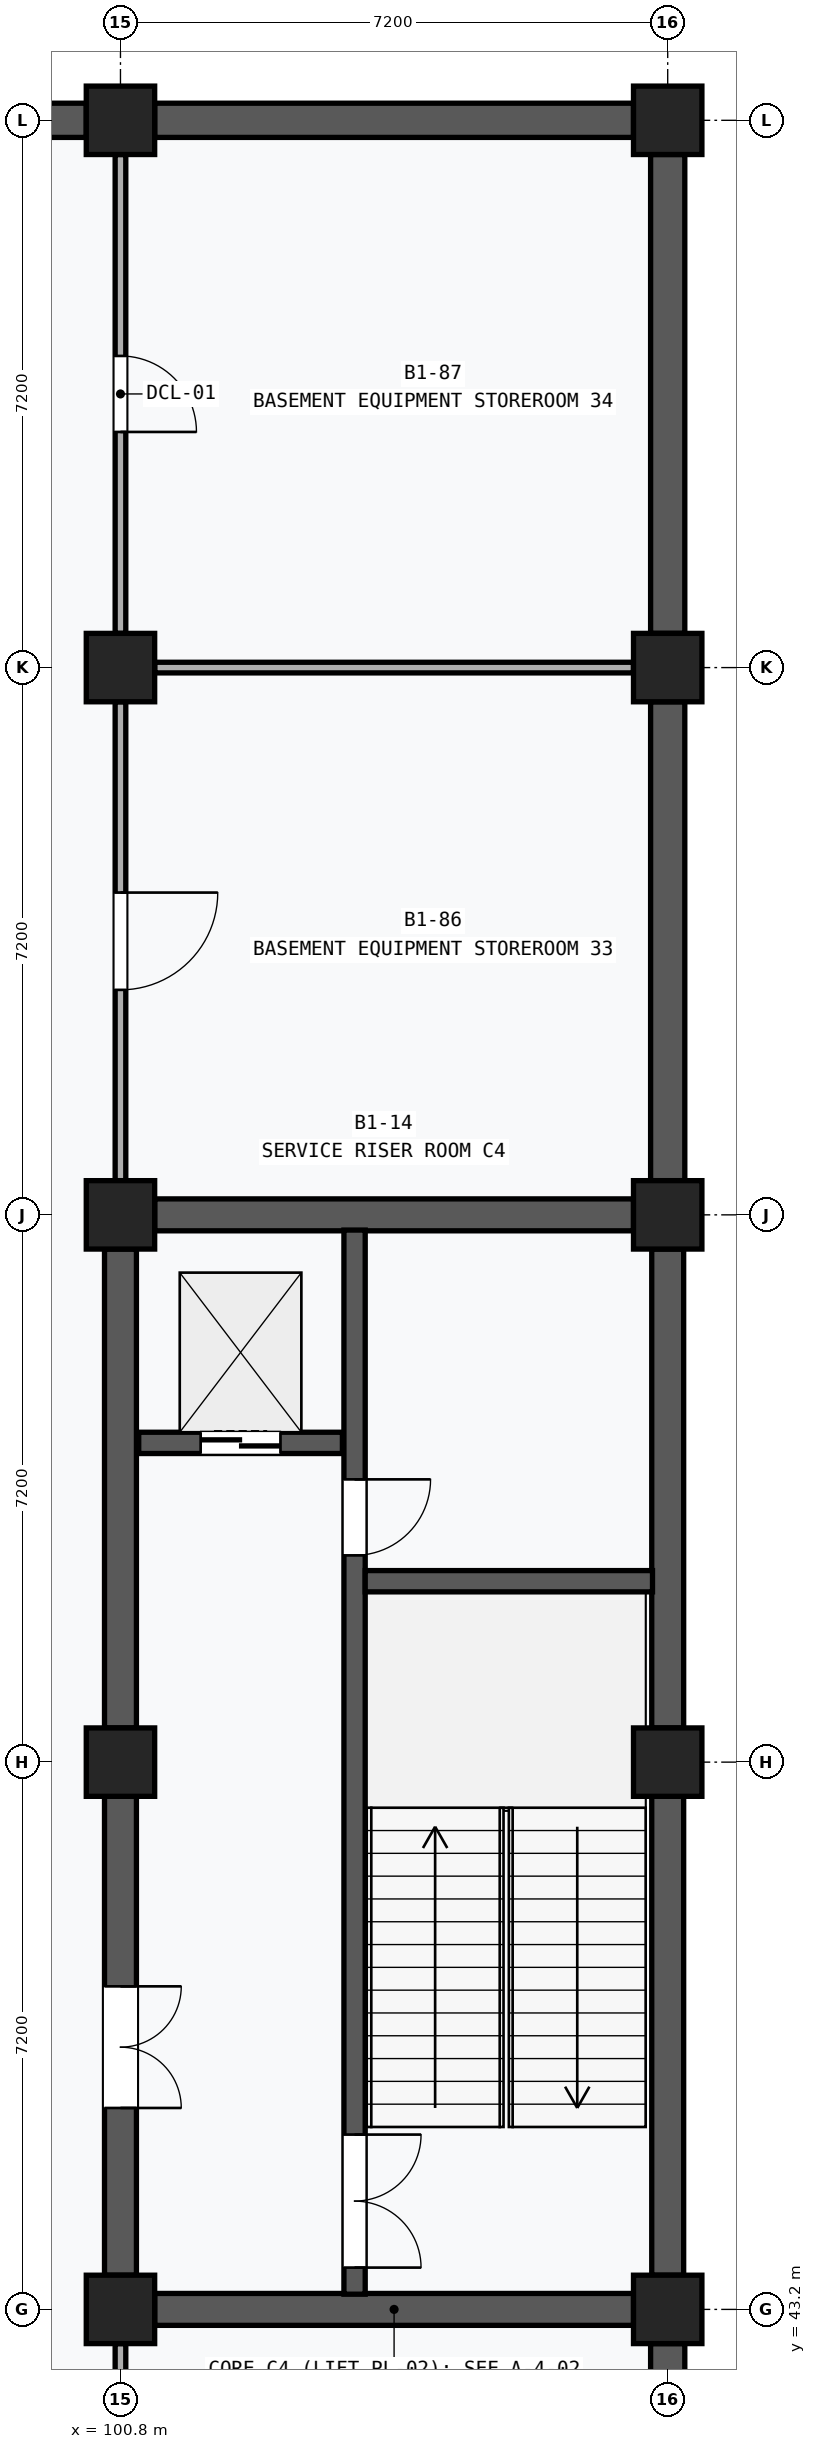
"""IFC4 building model, lengths in metres.
Left out: names, types, materials, properties, quantities, classifications, styles, units other than length and angle.
Written with IfcOpenShell. Run it as: python <this file> out.ifc"""

import sys

from ifc_helpers import new_model, si_unit, direction, frame, frame_2d, origin, origin_2d, place, context, subcontext, project, spatial, rectangle, extrude, element, fill, save


model = new_model("IFC4")
c1 = context("Model", 3, precision=1e-05, world=origin(), true_north=direction((0.0, 1.0)))
c2 = subcontext(c1, "Body", "Model", "MODEL_VIEW")
j1 = project(units=[si_unit("LENGTHUNIT", "METRE"), si_unit("PLANEANGLEUNIT", "RADIAN")], contexts=[c1])
p1 = place(None, origin())
s1 = spatial("IfcSite", under=j1, at=p1, CompositionType="ELEMENT")
p2 = place(p1, origin())
s2 = spatial("IfcBuilding", under=s1, at=p2, CompositionType="ELEMENT")
p3 = place(p2, frame((0.0, 0.0, -4.5)))
s3 = spatial("IfcBuildingStorey", under=s2, at=p3, CompositionType="ELEMENT", Elevation=-4.5)
for number, where, z_axis, x_axis in (
    (1, (100.8, 43.2, 0.0), (0.0, 0.0, 1.0), (1.0, 0.0, 0.0)),
    (2, (100.8, 50.4, 0.0), (0.0, 0.0, 1.0), (1.0, 0.0, 0.0)),
    (3, (100.8, 57.6, 0.0), (0.0, 0.0, 1.0), (1.0, 0.0, 0.0)),
    (4, (100.8, 64.8, 0.0), (0.0, 0.0, 1.0), (1.0, 0.0, 0.0)),
    (5, (100.8, 72.0, 0.0), (0.0, 0.0, 1.0), (1.0, 0.0, 0.0)),
    (6, (108.0, 43.2, 0.0), (0.0, 0.0, 1.0), (1.0, 0.0, 0.0)),
    (7, (108.0, 50.4, 0.0), (0.0, 0.0, 1.0), (1.0, 0.0, 0.0)),
    (8, (108.0, 57.6, 0.0), (0.0, 0.0, 1.0), (1.0, 0.0, 0.0)),
    (9, (108.0, 64.8, 0.0), (0.0, 0.0, 1.0), (1.0, 0.0, 0.0)),
    (10, (108.0, 72.0, 0.0), (0.0, 0.0, 1.0), (1.0, 0.0, 0.0)),
):
    element("IfcColumn", number, at=place(p3, frame(where, z_axis=z_axis, x_axis=x_axis)), inside=s3, PredefinedType="COLUMN", context=c2, shape_type="SweptSolid", body=[
        extrude(rectangle(XDim=0.9, YDim=0.9, at=origin_2d()), origin(), (0.0, 0.0, 1.0), 4.5),
    ])
p4 = place(p3, frame((94.0, 72.0, 0.0), z_axis=(0.0, 0.0, 1.0), x_axis=(1.0, 0.0, 0.0)))
e11 = element("IfcWall", 11, at=p4, inside=s3, PredefinedType="SOLIDWALL", context=c2, shape_type="SweptSolid", body=[
    extrude(rectangle(XDim=6.35, YDim=0.45, at=frame_2d((3.175, 0.0))), origin(), (0.0, 0.0, 1.0), 3.57),
])
for number, where, z_axis, x_axis in (
    (12, (108.0, 36.45, 0.0), (0.0, 0.0, 1.0), (0.0, 1.0, 0.0)),
    (13, (108.0, 58.05, 0.0), (0.0, 0.0, 1.0), (0.0, 1.0, 0.0)),
    (14, (101.25, 72.0, 0.0), (0.0, 0.0, 1.0), (1.0, 0.0, 0.0)),
    (15, (108.0, 65.25, 0.0), (0.0, 0.0, 1.0), (0.0, 1.0, 0.0)),
):
    element("IfcWall", number, at=place(p3, frame(where, z_axis=z_axis, x_axis=x_axis)), inside=s3, PredefinedType="SOLIDWALL", context=c2, shape_type="SweptSolid", body=[
        extrude(rectangle(XDim=6.3, YDim=0.45, at=frame_2d((3.15, 0.0))), origin(), (0.0, 0.0, 1.0), 3.57),
    ])
p5 = place(p3, frame((100.8, 43.65, 0.0), z_axis=(0.0, 0.0, 1.0), x_axis=(0.0, 1.0, 0.0)))
e16 = element("IfcWall", 16, at=p5, inside=s3, PredefinedType="SHEAR", context=c2, shape_type="SweptSolid", body=[
    extrude(rectangle(XDim=6.3, YDim=0.42, at=frame_2d((3.15, 0.0))), origin(), (0.0, 0.0, 1.0), 3.3),
])
p6 = place(p5, frame((2.2, 0.0, 0.0)))
e17 = element("IfcOpeningElement", 17, at=p6, cuts=e16, PredefinedType="OPENING", context=c2, shape_type="SweptSolid", body=[
    extrude(rectangle(XDim=1.6, YDim=2.2, at=frame_2d((0.8, 1.1))), frame((0.0, 0.222, 0.0), z_axis=(0.0, -1.0, 0.0), x_axis=(1.0, 0.0, 0.0)), (0.0, 0.0, 1.0), 0.444),
])
p7 = place(p3, frame((100.8, 50.85, 0.0), z_axis=(0.0, 0.0, 1.0), x_axis=(0.0, 1.0, 0.0)))
e18 = element("IfcWall", 18, at=p7, inside=s3, PredefinedType="SHEAR", context=c2, shape_type="SweptSolid", body=[
    extrude(rectangle(XDim=6.3, YDim=0.42, at=frame_2d((3.15, 0.0))), origin(), (0.0, 0.0, 1.0), 3.3),
])
p8 = place(p3, frame((108.0, 43.65, 0.0), z_axis=(0.0, 0.0, 1.0), x_axis=(0.0, 1.0, 0.0)))
e19 = element("IfcWall", 19, at=p8, inside=s3, PredefinedType="SHEAR", context=c2, shape_type="SweptSolid", body=[
    extrude(rectangle(XDim=6.3, YDim=0.42, at=frame_2d((3.15, 0.0))), origin(), (0.0, 0.0, 1.0), 3.57),
])
p9 = place(p3, frame((108.0, 50.85, 0.0), z_axis=(0.0, 0.0, 1.0), x_axis=(0.0, 1.0, 0.0)))
e20 = element("IfcWall", 20, at=p9, inside=s3, PredefinedType="SHEAR", context=c2, shape_type="SweptSolid", body=[
    extrude(rectangle(XDim=6.3, YDim=0.42, at=frame_2d((3.15, 0.0))), origin(), (0.0, 0.0, 1.0), 3.57),
])
for number, where, z_axis, x_axis in (
    (21, (101.25, 43.2, 0.0), (0.0, 0.0, 1.0), (1.0, 0.0, 0.0)),
    (22, (101.25, 57.6, 0.0), (0.0, 0.0, 1.0), (1.0, 0.0, 0.0)),
):
    element("IfcWall", number, at=place(p3, frame(where, z_axis=z_axis, x_axis=x_axis)), inside=s3, PredefinedType="SHEAR", context=c2, shape_type="SweptSolid", body=[
        extrude(rectangle(XDim=6.3, YDim=0.42, at=frame_2d((3.15, 0.0))), origin(), (0.0, 0.0, 1.0), 3.3),
    ])
p10 = place(p3, frame((103.88, 43.4, 0.0), z_axis=(0.0, 0.0, 1.0), x_axis=(0.0, 1.0, 0.0)))
e23 = element("IfcWall", 23, at=p10, inside=s3, PredefinedType="SHEAR", context=c2, shape_type="SweptSolid", body=[
    extrude(rectangle(XDim=14.0, YDim=0.28, at=frame_2d((7.0, 0.0))), origin(), (0.0, 0.0, 1.0), 4.2),
])
p11 = place(p10, frame((0.35, 0.0, 0.0)))
e24 = element("IfcOpeningElement", 24, at=p11, cuts=e23, PredefinedType="OPENING", context=c2, shape_type="SweptSolid", body=[
    extrude(rectangle(XDim=1.75, YDim=2.15, at=frame_2d((0.875, 1.075))), frame((0.0, 0.152, 0.0), z_axis=(0.0, -1.0, 0.0), x_axis=(1.0, 0.0, 0.0)), (0.0, 0.0, 1.0), 0.304),
])
p12 = place(p10, frame((9.72, 0.0, 0.0)))
e25 = element("IfcOpeningElement", 25, at=p12, cuts=e23, PredefinedType="OPENING", context=c2, shape_type="SweptSolid", body=[
    extrude(rectangle(XDim=1.0, YDim=2.15, at=frame_2d((0.5, 1.075))), frame((0.0, 0.152, 0.0), z_axis=(0.0, -1.0, 0.0), x_axis=(1.0, 0.0, 0.0)), (0.0, 0.0, 1.0), 0.304),
])
p13 = place(p3, frame((104.02, 52.78, 0.0), z_axis=(0.0, 0.0, 1.0), x_axis=(1.0, 0.0, 0.0)))
e26 = element("IfcWall", 26, at=p13, inside=s3, PredefinedType="SHEAR", context=c2, shape_type="SweptSolid", body=[
    extrude(rectangle(XDim=3.78, YDim=0.28, at=frame_2d((1.89, 0.0))), origin(), (0.0, 0.0, 1.0), 4.2),
])
p14 = place(p3, frame((101.04, 54.6, 0.0), z_axis=(0.0, 0.0, 1.0), x_axis=(1.0, 0.0, 0.0)))
e27 = element("IfcWall", 27, at=p14, inside=s3, PredefinedType="SHEAR", context=c2, shape_type="SweptSolid", body=[
    extrude(rectangle(XDim=2.68, YDim=0.28, at=frame_2d((1.34, 0.0))), origin(), (0.0, 0.0, 1.0), 4.2),
])
p15 = place(p14, frame((0.815, 0.0, 0.0)))
e28 = element("IfcOpeningElement", 28, at=p15, cuts=e27, PredefinedType="OPENING", context=c2, shape_type="SweptSolid", body=[
    extrude(rectangle(XDim=1.05, YDim=2.2, at=frame_2d((0.525, 1.1))), frame((0.0, 0.152, 0.0), z_axis=(0.0, -1.0, 0.0), x_axis=(1.0, 0.0, 0.0)), (0.0, 0.0, 1.0), 0.304),
])
p16 = place(p3, frame((100.8, 36.45, 0.0), z_axis=(0.0, 0.0, 1.0), x_axis=(0.0, 1.0, 0.0)))
e29 = element("IfcWall", 29, at=p16, inside=s3, PredefinedType="PARTITIONING", context=c2, shape_type="SweptSolid", body=[
    extrude(rectangle(XDim=6.3, YDim=0.14, at=frame_2d((3.15, 0.0))), origin(), (0.0, 0.0, 1.0), 3.3),
])
p17 = place(p16, frame((2.53, 0.0, 0.0)))
e30 = element("IfcOpeningElement", 30, at=p17, cuts=e29, PredefinedType="OPENING", context=c2, shape_type="SweptSolid", body=[
    extrude(rectangle(XDim=1.24, YDim=2.26, at=frame_2d((0.62, 1.13))), frame((0.0, 0.082, 0.0), z_axis=(0.0, -1.0, 0.0), x_axis=(1.0, 0.0, 0.0)), (0.0, 0.0, 1.0), 0.164),
])
p18 = place(p3, frame((101.25, 64.8, 0.0), z_axis=(0.0, 0.0, 1.0), x_axis=(1.0, 0.0, 0.0)))
e31 = element("IfcWall", 31, at=p18, inside=s3, PredefinedType="PARTITIONING", context=c2, shape_type="SweptSolid", body=[
    extrude(rectangle(XDim=6.3, YDim=0.14, at=frame_2d((3.15, 0.0))), origin(), (0.0, 0.0, 1.0), 3.3),
])
p19 = place(p3, frame((100.8, 58.05, 0.0), z_axis=(0.0, 0.0, 1.0), x_axis=(0.0, 1.0, 0.0)))
e32 = element("IfcWall", 32, at=p19, inside=s3, PredefinedType="PARTITIONING", context=c2, shape_type="SweptSolid", body=[
    extrude(rectangle(XDim=6.3, YDim=0.14, at=frame_2d((3.15, 0.0))), origin(), (0.0, 0.0, 1.0), 3.3),
])
p20 = place(p19, frame((2.51, 0.0, 0.0)))
e33 = element("IfcOpeningElement", 33, at=p20, cuts=e32, PredefinedType="OPENING", context=c2, shape_type="SweptSolid", body=[
    extrude(rectangle(XDim=1.28, YDim=2.28, at=frame_2d((0.64, 1.14))), frame((0.0, 0.082, 0.0), z_axis=(0.0, -1.0, 0.0), x_axis=(1.0, 0.0, 0.0)), (0.0, 0.0, 1.0), 0.164),
])
p21 = place(p3, frame((100.8, 65.25, 0.0), z_axis=(0.0, 0.0, 1.0), x_axis=(0.0, 1.0, 0.0)))
e34 = element("IfcWall", 34, at=p21, inside=s3, PredefinedType="PARTITIONING", context=c2, shape_type="SweptSolid", body=[
    extrude(rectangle(XDim=6.3, YDim=0.14, at=frame_2d((3.15, 0.0))), origin(), (0.0, 0.0, 1.0), 3.3),
])
p22 = place(p21, frame((2.65, 0.0, 0.0)))
e35 = element("IfcOpeningElement", 35, at=p22, cuts=e34, PredefinedType="OPENING", context=c2, shape_type="SweptSolid", body=[
    extrude(rectangle(XDim=1.0, YDim=2.1, at=frame_2d((0.5, 1.05))), frame((0.0, 0.082, 0.0), z_axis=(0.0, -1.0, 0.0), x_axis=(1.0, 0.0, 0.0)), (0.0, 0.0, 1.0), 0.164),
])
p23 = place(p6, frame((1.6, 0.0, 0.0), z_axis=(0.0, 0.0, 1.0), x_axis=(-1.0, 0.0, 0.0)))
e36 = element("IfcDoor", 36, at=p23, inside=s3, OperationType="DOUBLE_DOOR_SINGLE_SWING", PredefinedType="DOOR", context=c2, shape_type="SweptSolid", body=[
    extrude(rectangle(XDim=1.6, YDim=2.2, at=frame_2d((0.8, 1.1))), frame((0.0, 0.025, 0.0), z_axis=(0.0, -1.0, 0.0), x_axis=(1.0, 0.0, 0.0)), (0.0, 0.0, 1.0), 0.05),
])
fill(e17, e36)
p24 = place(p11, frame((1.75, 0.0, 0.0), z_axis=(0.0, 0.0, 1.0), x_axis=(-1.0, 0.0, 0.0)))
e37 = element("IfcDoor", 37, at=p24, inside=s3, OperationType="DOUBLE_DOOR_SINGLE_SWING", PredefinedType="DOOR", context=c2, shape_type="SweptSolid", body=[
    extrude(rectangle(XDim=1.75, YDim=2.15, at=frame_2d((0.875, 1.075))), frame((0.0, 0.025, 0.0), z_axis=(0.0, -1.0, 0.0), x_axis=(1.0, 0.0, 0.0)), (0.0, 0.0, 1.0), 0.05),
])
fill(e24, e37)
p25 = place(p12, frame((1.0, 0.0, 0.0), z_axis=(0.0, 0.0, 1.0), x_axis=(-1.0, 0.0, 0.0)))
e38 = element("IfcDoor", 38, at=p25, inside=s3, OperationType="SINGLE_SWING_LEFT", PredefinedType="DOOR", context=c2, shape_type="SweptSolid", body=[
    extrude(rectangle(XDim=1.0, YDim=2.15, at=frame_2d((0.5, 1.075))), frame((0.0, 0.025, 0.0), z_axis=(0.0, -1.0, 0.0), x_axis=(1.0, 0.0, 0.0)), (0.0, 0.0, 1.0), 0.05),
])
fill(e25, e38)
p26 = place(p15, frame((1.05, 0.0, 0.0), z_axis=(0.0, 0.0, 1.0), x_axis=(-1.0, 0.0, 0.0)))
e39 = element("IfcDoor", 39, at=p26, inside=s3, OperationType="DOUBLE_DOOR_SLIDING", PredefinedType="DOOR", context=c2, shape_type="SweptSolid", body=[
    extrude(rectangle(XDim=1.05, YDim=2.2, at=frame_2d((0.525, 1.1))), frame((0.0, 0.025, 0.0), z_axis=(0.0, -1.0, 0.0), x_axis=(1.0, 0.0, 0.0)), (0.0, 0.0, 1.0), 0.05),
])
fill(e28, e39)
p27 = place(p20, frame((1.28, 0.0, 0.0), z_axis=(0.0, 0.0, 1.0), x_axis=(-1.0, 0.0, 0.0)))
e40 = element("IfcDoor", 40, at=p27, inside=s3, OperationType="SINGLE_SWING_LEFT", PredefinedType="DOOR", context=c2, shape_type="SweptSolid", body=[
    extrude(rectangle(XDim=1.28, YDim=2.28, at=frame_2d((0.64, 1.14))), frame((0.0, 0.025, 0.0), z_axis=(0.0, -1.0, 0.0), x_axis=(1.0, 0.0, 0.0)), (0.0, 0.0, 1.0), 0.05),
])
fill(e33, e40)
p28 = place(p22, frame((1.0, 0.0, 0.0), z_axis=(0.0, 0.0, 1.0), x_axis=(-1.0, 0.0, 0.0)))
e41 = element("IfcDoor", 41, at=p28, inside=s3, OperationType="SINGLE_SWING_RIGHT", PredefinedType="DOOR", context=c2, shape_type="SweptSolid", body=[
    extrude(rectangle(XDim=1.0, YDim=2.1, at=frame_2d((0.5, 1.05))), frame((0.0, 0.025, 0.0), z_axis=(0.0, -1.0, 0.0), x_axis=(1.0, 0.0, 0.0)), (0.0, 0.0, 1.0), 0.05),
])
fill(e35, e41)
save(model, sys.argv[1])
